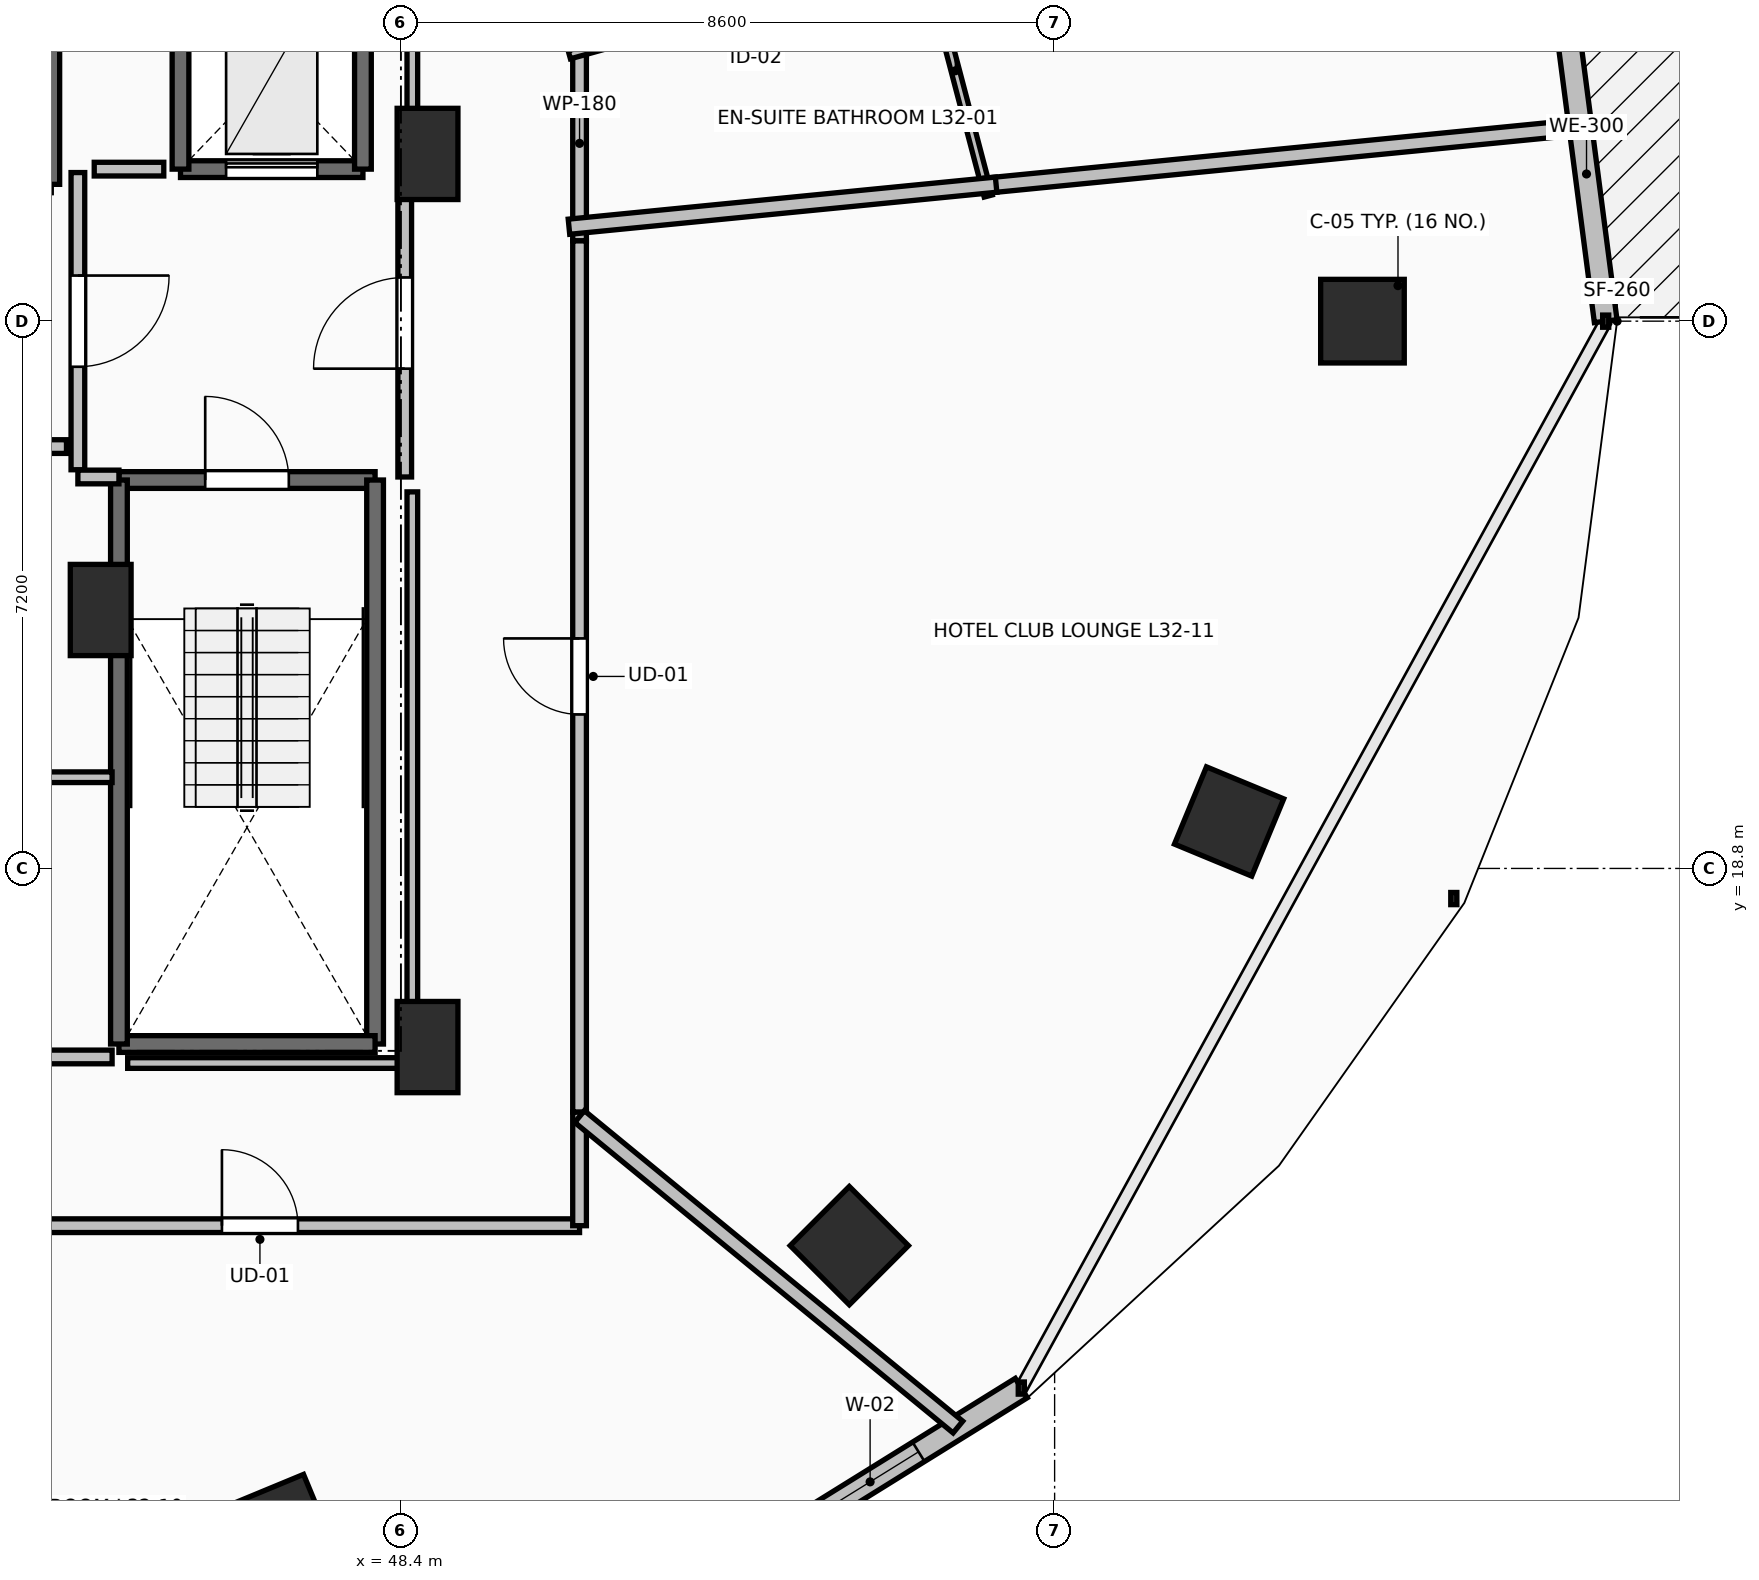
"""IFC4 building model, lengths in metres.
Left out: names, types, materials, properties, quantities, classifications, styles, units other than length and angle.
Written with IfcOpenShell. Run it as: python <this file> out.ifc"""

import sys

from ifc_helpers import new_model, si_unit, direction, frame, frame_2d, origin, origin_2d, place, context, subcontext, project, spatial, rectangle, extrude, element, fill, save


model = new_model("IFC4")
c1 = context("Model", 3, precision=1e-05, world=origin(), true_north=direction((0.0, 1.0)))
c2 = subcontext(c1, "Body", "Model", "MODEL_VIEW")
j1 = project(units=[si_unit("LENGTHUNIT", "METRE"), si_unit("PLANEANGLEUNIT", "RADIAN")], contexts=[c1])
p1 = place(None, origin())
s1 = spatial("IfcSite", under=j1, at=p1, CompositionType="ELEMENT")
p2 = place(p1, origin())
s2 = spatial("IfcBuilding", under=s1, at=p2, CompositionType="ELEMENT")
p3 = place(p2, frame((0.0, 0.0, 120.8)))
s3 = spatial("IfcBuildingStorey", under=s2, at=p3, CompositionType="ELEMENT", Elevation=120.8)
for number, where, z_axis, x_axis in (
    (1, (61.05, 26.0, 0.0), (0.0, 0.0, 1.0), (1.0, 0.0, 0.0)),
    (2, (46.821, 10.109, 0.0), (0.0, 0.0, 1.0), (0.383, -0.924, 0.0)),
    (3, (54.299, 13.838, 0.0), (0.0, 0.0, 1.0), (0.707, -0.707, 0.0)),
    (4, (59.295, 19.418, 0.0), (0.0, 0.0, 1.0), (0.924, -0.383, 0.0)),
):
    element("IfcColumn", number, at=place(p3, frame(where, z_axis=z_axis, x_axis=x_axis)), inside=s3, PredefinedType="COLUMN", context=c2, shape_type="SweptSolid", body=[
        extrude(rectangle(XDim=1.1, YDim=1.1, at=origin_2d()), origin(), (0.0, 0.0, 1.0), 3.5),
    ])
for number, where, z_axis, x_axis in (
    (5, (48.75, 28.2, 0.0), (0.0, 0.0, 1.0), (1.0, 0.0, 0.0)),
    (6, (48.75, 16.45, 0.0), (0.0, 0.0, 1.0), (1.0, 0.0, 0.0)),
    (7, (44.45, 22.2, 0.0), (0.0, 0.0, 1.0), (1.0, 0.0, 0.0)),
):
    element("IfcColumn", number, at=place(p3, frame(where, z_axis=z_axis, x_axis=x_axis)), inside=s3, PredefinedType="PILASTER", context=c2, shape_type="SweptSolid", body=[
        extrude(rectangle(XDim=0.8, YDim=1.2, at=origin_2d()), origin(), (0.0, 0.0, 1.0), 3.5),
    ])
p4 = place(p3, frame((64.25, 26.0, 0.0), z_axis=(0.0, 0.0, 1.0), x_axis=(-0.129157444793, 0.991624099372, 0.0)))
e8 = element("IfcWall", 8, at=p4, inside=s3, PredefinedType="STANDARD", context=c2, shape_type="SweptSolid", body=[
    extrude(rectangle(XDim=3.905, YDim=0.3, at=frame_2d((1.953, 0.0))), origin(), (0.0, 0.0, 1.0), 3.15),
])
p5 = place(p3, frame((52.584, 9.495, 0.0), z_axis=(0.0, 0.0, 1.0), x_axis=(0.849684479743, 0.527291461038, 0.0)))
e9 = element("IfcWall", 9, at=p5, inside=s3, PredefinedType="STANDARD", context=c2, shape_type="SweptSolid", body=[
    extrude(rectangle(XDim=4.681, YDim=0.3, at=frame_2d((2.341, 0.0))), origin(), (0.0, 0.0, 1.0), 3.15),
])
p6 = place(p5, frame((1.591, 0.0, 0.85)))
e10 = element("IfcOpeningElement", 10, at=p6, cuts=e9, PredefinedType="OPENING", context=c2, shape_type="SweptSolid", body=[
    extrude(rectangle(XDim=1.5, YDim=2.1, at=frame_2d((0.75, 1.05))), frame((0.0, 0.165, 0.0), z_axis=(0.0, -1.0, 0.0), x_axis=(1.0, 0.0, 0.0)), (0.0, 0.0, 1.0), 0.33),
])
p7 = place(p3, frame((44.69, 23.91, 0.0), z_axis=(0.0, 0.0, 1.0), x_axis=(1.0, 0.0, 0.0)))
e11 = element("IfcWall", 11, at=p7, inside=s3, PredefinedType="SOLIDWALL", context=c2, shape_type="SweptSolid", body=[
    extrude(rectangle(XDim=3.37, YDim=0.22, at=frame_2d((1.685, 0.0))), origin(), (0.0, 0.0, 1.0), 3.15),
])
p8 = place(p7, frame((1.135, 0.0, 0.0)))
e12 = element("IfcOpeningElement", 12, at=p8, cuts=e11, PredefinedType="OPENING", context=c2, shape_type="SweptSolid", body=[
    extrude(rectangle(XDim=1.1, YDim=2.15, at=frame_2d((0.55, 1.075))), frame((0.0, 0.125, 0.0), z_axis=(0.0, -1.0, 0.0), x_axis=(1.0, 0.0, 0.0)), (0.0, 0.0, 1.0), 0.25),
])
p9 = place(p3, frame((48.06, 23.91, 0.0), z_axis=(0.0, 0.0, 1.0), x_axis=(0.0, -1.0, 0.0)))
e13 = element("IfcWall", 13, at=p9, inside=s3, PredefinedType="SOLIDWALL", context=c2, shape_type="SweptSolid", body=[
    extrude(rectangle(XDim=7.42, YDim=0.22, at=frame_2d((3.71, 0.0))), origin(), (0.0, 0.0, 1.0), 3.15),
])
p10 = place(p3, frame((48.06, 16.49, 0.0), z_axis=(0.0, 0.0, 1.0), x_axis=(-1.0, 0.0, 0.0)))
e14 = element("IfcWall", 14, at=p10, inside=s3, PredefinedType="SOLIDWALL", context=c2, shape_type="SweptSolid", body=[
    extrude(rectangle(XDim=3.37, YDim=0.22, at=frame_2d((1.685, 0.0))), origin(), (0.0, 0.0, 1.0), 3.15),
])
p11 = place(p3, frame((44.69, 16.49, 0.0), z_axis=(0.0, 0.0, 1.0), x_axis=(0.0, 1.0, 0.0)))
e15 = element("IfcWall", 15, at=p11, inside=s3, PredefinedType="SOLIDWALL", context=c2, shape_type="SweptSolid", body=[
    extrude(rectangle(XDim=7.42, YDim=0.22, at=frame_2d((3.71, 0.0))), origin(), (0.0, 0.0, 1.0), 3.15),
])
p12 = place(p3, frame((43.8, 27.8, 0.0), z_axis=(0.0, 0.0, 1.0), x_axis=(0.0, 1.0, 0.0)))
e16 = element("IfcWall", 16, at=p12, inside=s3, PredefinedType="SOLIDWALL", context=c2, shape_type="SweptSolid", body=[
    extrude(rectangle(XDim=2.6, YDim=0.22, at=frame_2d((1.3, 0.0))), origin(), (0.0, 0.0, 1.0), 3.15),
])
p13 = place(p3, frame((45.5, 28.0, 0.0), z_axis=(0.0, 0.0, 1.0), x_axis=(1.0, 0.0, 0.0)))
e17 = element("IfcWall", 17, at=p13, inside=s3, PredefinedType="SHEAR", context=c2, shape_type="SweptSolid", body=[
    extrude(rectangle(XDim=2.4, YDim=0.22, at=frame_2d((1.2, 0.0))), origin(), (0.0, 0.0, 1.0), 3.15),
])
p14 = place(p13, frame((0.6, 0.0, 0.0)))
e18 = element("IfcOpeningElement", 18, at=p14, cuts=e17, PredefinedType="OPENING", context=c2, shape_type="SweptSolid", body=[
    extrude(rectangle(XDim=1.2, YDim=2.2, at=frame_2d((0.6, 1.1))), frame((0.0, 0.125, 0.0), z_axis=(0.0, -1.0, 0.0), x_axis=(1.0, 0.0, 0.0)), (0.0, 0.0, 1.0), 0.25),
])
for number, where, z_axis, x_axis in (
    (19, (47.9, 28.0, 0.0), (0.0, 0.0, 1.0), (0.0, 1.0, 0.0)),
    (20, (45.5, 30.5, 0.0), (0.0, 0.0, 1.0), (0.0, -1.0, 0.0)),
):
    element("IfcWall", number, at=place(p3, frame(where, z_axis=z_axis, x_axis=x_axis)), inside=s3, PredefinedType="SHEAR", context=c2, shape_type="SweptSolid", body=[
        extrude(rectangle(XDim=2.5, YDim=0.22, at=frame_2d((1.25, 0.0))), origin(), (0.0, 0.0, 1.0), 3.15),
    ])
p15 = place(p3, frame((44.15, 27.955, 0.0), z_axis=(0.0, 0.0, 1.0), x_axis=(0.0, -1.0, 0.0)))
e21 = element("IfcWall", 21, at=p15, inside=s3, PredefinedType="PARTITIONING", context=c2, shape_type="SweptSolid", body=[
    extrude(rectangle(XDim=3.91, YDim=0.18, at=frame_2d((1.955, 0.0))), origin(), (0.0, 0.0, 1.0), 3.15),
])
p16 = place(p15, frame((1.355, 0.0, 0.0)))
e22 = element("IfcOpeningElement", 22, at=p16, cuts=e21, PredefinedType="OPENING", context=c2, shape_type="SweptSolid", body=[
    extrude(rectangle(XDim=1.2, YDim=2.15, at=frame_2d((0.6, 1.075))), frame((0.0, 0.105, 0.0), z_axis=(0.0, -1.0, 0.0), x_axis=(1.0, 0.0, 0.0)), (0.0, 0.0, 1.0), 0.21),
])
p17 = place(p3, frame((44.15, 23.95, 0.0), z_axis=(0.0, 0.0, 1.0), x_axis=(1.0, 0.0, 0.0)))
e23 = element("IfcWall", 23, at=p17, inside=s3, PredefinedType="PARTITIONING", context=c2, shape_type="SweptSolid", body=[
    extrude(rectangle(XDim=0.54, YDim=0.18, at=frame_2d((0.27, 0.0))), origin(), (0.0, 0.0, 1.0), 3.15),
])
p18 = place(p3, frame((48.45, 23.95, 0.0), z_axis=(0.0, 0.0, 1.0), x_axis=(0.0, 1.0, 0.0)))
e24 = element("IfcWall", 24, at=p18, inside=s3, PredefinedType="PARTITIONING", context=c2, shape_type="SweptSolid", body=[
    extrude(rectangle(XDim=4.05, YDim=0.18, at=frame_2d((2.025, 0.0))), origin(), (0.0, 0.0, 1.0), 3.15),
])
p19 = place(p18, frame((1.425, 0.0, 0.0)))
e25 = element("IfcOpeningElement", 25, at=p19, cuts=e24, PredefinedType="OPENING", context=c2, shape_type="SweptSolid", body=[
    extrude(rectangle(XDim=1.2, YDim=2.15, at=frame_2d((0.6, 1.075))), frame((0.0, 0.105, 0.0), z_axis=(0.0, -1.0, 0.0), x_axis=(1.0, 0.0, 0.0)), (0.0, 0.0, 1.0), 0.21),
])
p20 = place(p3, frame((41.555, 24.35, 0.0), z_axis=(0.0, 0.0, 1.0), x_axis=(1.0, 0.0, 0.0)))
e26 = element("IfcWall", 26, at=p20, inside=s3, PredefinedType="PARTITIONING", context=c2, shape_type="SweptSolid", body=[
    extrude(rectangle(XDim=2.445, YDim=0.18, at=frame_2d((1.223, 0.0))), origin(), (0.0, 0.0, 1.0), 3.15),
])
p21 = place(p20, frame((0.798, 0.0, 0.0)))
e27 = element("IfcOpeningElement", 27, at=p21, cuts=e26, PredefinedType="OPENING", context=c2, shape_type="SweptSolid", body=[
    extrude(rectangle(XDim=0.85, YDim=2.1, at=frame_2d((0.425, 1.05))), frame((0.0, 0.105, 0.0), z_axis=(0.0, -1.0, 0.0), x_axis=(1.0, 0.0, 0.0)), (0.0, 0.0, 1.0), 0.21),
])
p22 = place(p3, frame((44.6, 20.0, 0.0), z_axis=(0.0, 0.0, 1.0), x_axis=(-1.0, 0.0, 0.0)))
e28 = element("IfcWall", 28, at=p22, inside=s3, PredefinedType="PARTITIONING", context=c2, shape_type="SweptSolid", body=[
    extrude(rectangle(XDim=3.2, YDim=0.14, at=frame_2d((1.6, 0.0))), origin(), (0.0, 0.0, 1.0), 3.15),
])
p23 = place(p3, frame((41.4, 16.32, 0.0), z_axis=(0.0, 0.0, 1.0), x_axis=(1.0, 0.0, 0.0)))
e29 = element("IfcWall", 29, at=p23, inside=s3, PredefinedType="PARTITIONING", context=c2, shape_type="SweptSolid", body=[
    extrude(rectangle(XDim=3.2, YDim=0.18, at=frame_2d((1.6, 0.0))), origin(), (0.0, 0.0, 1.0), 3.15),
])
p24 = place(p23, frame((1.2, 0.0, 0.0)))
e30 = element("IfcOpeningElement", 30, at=p24, cuts=e29, PredefinedType="OPENING", context=c2, shape_type="SweptSolid", body=[
    extrude(rectangle(XDim=0.8, YDim=2.05, at=frame_2d((0.4, 1.025))), frame((0.0, 0.105, 0.0), z_axis=(0.0, -1.0, 0.0), x_axis=(1.0, 0.0, 0.0)), (0.0, 0.0, 1.0), 0.21),
])
p25 = place(p3, frame((50.75, 29.482, 0.0), z_axis=(0.0, 0.0, 1.0), x_axis=(0.0, 1.0, 0.0)))
e31 = element("IfcWall", 31, at=p25, inside=s3, PredefinedType="PARTITIONING", context=c2, shape_type="SweptSolid", body=[
    extrude(rectangle(XDim=3.401, YDim=0.18, at=frame_2d((1.701, 0.0))), origin(), (0.0, 0.0, 1.0), 2.342),
])
p26 = place(p25, frame((1.176, 0.0, 0.0)))
e32 = element("IfcOpeningElement", 32, at=p26, cuts=e31, PredefinedType="OPENING", context=c2, shape_type="SweptSolid", body=[
    extrude(rectangle(XDim=1.05, YDim=2.2, at=frame_2d((0.525, 1.1))), frame((0.0, 0.105, 0.0), z_axis=(0.0, -1.0, 0.0), x_axis=(1.0, 0.0, 0.0)), (0.0, 0.0, 1.0), 0.21),
])
p27 = place(p3, frame((50.75, 27.056, 0.0), z_axis=(0.0, 0.0, 1.0), x_axis=(0.0, 1.0, 0.0)))
e33 = element("IfcWall", 33, at=p27, inside=s3, PredefinedType="PARTITIONING", context=c2, shape_type="SweptSolid", body=[
    extrude(rectangle(XDim=2.566, YDim=0.18, at=frame_2d((1.283, 0.0))), origin(), (0.0, 0.0, 1.0), 2.342),
])
p28 = place(p3, frame((42.34, 14.1, 0.0), z_axis=(0.0, 0.0, 1.0), x_axis=(1.0, 0.0, 0.0)))
e34 = element("IfcWall", 34, at=p28, inside=s3, PredefinedType="PARTITIONING", context=c2, shape_type="SweptSolid", body=[
    extrude(rectangle(XDim=8.41, YDim=0.18, at=frame_2d((4.205, 0.0))), origin(), (0.0, 0.0, 1.0), 2.342),
])
p29 = place(p28, frame((3.705, 0.0, 0.0)))
e35 = element("IfcOpeningElement", 35, at=p29, cuts=e34, PredefinedType="OPENING", context=c2, shape_type="SweptSolid", body=[
    extrude(rectangle(XDim=1.0, YDim=2.15, at=frame_2d((0.5, 1.075))), frame((0.0, 0.105, 0.0), z_axis=(0.0, -1.0, 0.0), x_axis=(1.0, 0.0, 0.0)), (0.0, 0.0, 1.0), 0.21),
])
p30 = place(p3, frame((50.75, 14.1, 0.0), z_axis=(0.0, 0.0, 1.0), x_axis=(0.0, 1.0, 0.0)))
e36 = element("IfcWall", 36, at=p30, inside=s3, PredefinedType="PARTITIONING", context=c2, shape_type="SweptSolid", body=[
    extrude(rectangle(XDim=1.496, YDim=0.18, at=frame_2d((0.748, 0.0))), origin(), (0.0, 0.0, 1.0), 2.342),
])
p31 = place(p3, frame((50.75, 15.596, 0.0), z_axis=(0.0, 0.0, 1.0), x_axis=(0.0, 1.0, 0.0)))
e37 = element("IfcWall", 37, at=p31, inside=s3, PredefinedType="PARTITIONING", context=c2, shape_type="SweptSolid", body=[
    extrude(rectangle(XDim=11.46, YDim=0.18, at=frame_2d((5.73, 0.0))), origin(), (0.0, 0.0, 1.0), 2.342),
])
p32 = place(p31, frame((5.23, 0.0, 0.0)))
e38 = element("IfcOpeningElement", 38, at=p32, cuts=e37, PredefinedType="OPENING", context=c2, shape_type="SweptSolid", body=[
    extrude(rectangle(XDim=1.0, YDim=2.15, at=frame_2d((0.5, 1.075))), frame((0.0, 0.105, 0.0), z_axis=(0.0, -1.0, 0.0), x_axis=(1.0, 0.0, 0.0)), (0.0, 0.0, 1.0), 0.21),
])
p33 = place(p3, frame((55.26, 30.94, 0.0), z_axis=(0.0, 0.0, 1.0), x_axis=(0.254323935255, -0.967119090886, 0.0)))
e39 = element("IfcWall", 39, at=p33, inside=s3, PredefinedType="PARTITIONING", context=c2, shape_type="SweptSolid", body=[
    extrude(rectangle(XDim=3.406, YDim=0.11, at=frame_2d((1.703, 0.0))), origin(), (0.0, 0.0, 1.0), 2.839),
])
p34 = place(p3, frame((50.615, 29.504, 0.0), z_axis=(0.0, 0.0, 1.0), x_axis=(0.963498313434, 0.267714400078, 0.0)))
e40 = element("IfcWall", 40, at=p34, inside=s3, PredefinedType="PARTITIONING", context=c2, shape_type="SweptSolid", body=[
    extrude(rectangle(XDim=4.998, YDim=0.11, at=frame_2d((2.499, 0.0))), origin(), (0.0, 0.0, 1.0), 2.784),
])
p35 = place(p34, frame((2.074, 0.0, 0.0)))
e41 = element("IfcOpeningElement", 41, at=p35, cuts=e40, PredefinedType="OPENING", context=c2, shape_type="SweptSolid", body=[
    extrude(rectangle(XDim=0.85, YDim=2.1, at=frame_2d((0.425, 1.05))), frame((0.0, 0.07, 0.0), z_axis=(0.0, -1.0, 0.0), x_axis=(1.0, 0.0, 0.0)), (0.0, 0.0, 1.0), 0.14),
])
p36 = place(p3, frame((56.091, 27.782, 0.0), z_axis=(0.0, 0.0, 1.0), x_axis=(0.995182127762, 0.098043523927, 0.0)))
e42 = element("IfcWall", 42, at=p36, inside=s3, PredefinedType="PARTITIONING", context=c2, shape_type="SweptSolid", body=[
    extrude(rectangle(XDim=7.864, YDim=0.2, at=frame_2d((3.932, 0.0))), origin(), (0.0, 0.0, 1.0), 2.587),
])
p37 = place(p3, frame((50.611, 27.242, 0.0), z_axis=(0.0, 0.0, 1.0), x_axis=(0.995185043486, 0.098013923607, 0.0)))
e43 = element("IfcWall", 43, at=p37, inside=s3, PredefinedType="PARTITIONING", context=c2, shape_type="SweptSolid", body=[
    extrude(rectangle(XDim=5.647, YDim=0.2, at=frame_2d((2.823, 0.0))), origin(), (0.0, 0.0, 1.0), 2.342),
])
p38 = place(p3, frame((55.728, 11.451, 0.0), z_axis=(0.0, 0.0, 1.0), x_axis=(-0.7730409537, 0.634356117573, 0.0)))
e44 = element("IfcWall", 44, at=p38, inside=s3, PredefinedType="PARTITIONING", context=c2, shape_type="SweptSolid", body=[
    extrude(rectangle(XDim=6.439, YDim=0.2, at=frame_2d((3.22, 0.0))), origin(), (0.0, 0.0, 1.0), 2.342),
])
p39 = place(p3, frame((45.28, 28.0, 0.0), z_axis=(0.0, 0.0, 1.0), x_axis=(-1.0, 0.0, 0.0)))
e45 = element("IfcWall", 45, at=p39, inside=s3, PredefinedType="PARTITIONING", context=c2, shape_type="SweptSolid", body=[
    extrude(rectangle(XDim=0.915, YDim=0.18, at=frame_2d((0.458, 0.0))), origin(), (0.0, 0.0, 1.0), 3.15),
])
p40 = place(p3, frame((48.55, 33.45, 0.0), z_axis=(0.0, 0.0, 1.0), x_axis=(0.0, -1.0, 0.0)))
e46 = element("IfcWall", 46, at=p40, inside=s3, PredefinedType="PARTITIONING", context=c2, shape_type="SweptSolid", body=[
    extrude(rectangle(XDim=5.254, YDim=0.14, at=frame_2d((2.627, 0.0))), origin(), (0.0, 0.0, 1.0), 2.342),
])
p41 = place(p3, frame((48.55, 23.754, 0.0), z_axis=(0.0, 0.0, 1.0), x_axis=(0.0, -1.0, 0.0)))
e47 = element("IfcWall", 47, at=p41, inside=s3, PredefinedType="PARTITIONING", context=c2, shape_type="SweptSolid", body=[
    extrude(rectangle(XDim=7.514, YDim=0.14, at=frame_2d((3.757, 0.0))), origin(), (0.0, 0.0, 1.0), 2.342),
])
p42 = place(p3, frame((48.55, 16.24, 0.0), z_axis=(0.0, 0.0, 1.0), x_axis=(-1.0, 0.0, 0.0)))
e48 = element("IfcWall", 48, at=p42, inside=s3, PredefinedType="PARTITIONING", context=c2, shape_type="SweptSolid", body=[
    extrude(rectangle(XDim=3.745, YDim=0.14, at=frame_2d((1.873, 0.0))), origin(), (0.0, 0.0, 1.0), 2.342),
])
p43 = place(p6, origin())
e49 = element("IfcWindow", 49, at=p43, inside=s3, PartitioningType="SINGLE_PANEL", PredefinedType="WINDOW", context=c2, shape_type="SweptSolid", body=[
    extrude(rectangle(XDim=1.5, YDim=2.1, at=frame_2d((0.75, 1.05))), frame((0.0, 0.03, 0.0), z_axis=(0.0, -1.0, 0.0), x_axis=(1.0, 0.0, 0.0)), (0.0, 0.0, 1.0), 0.06),
])
fill(e10, e49)
p44 = place(p8, origin())
e50 = element("IfcDoor", 50, at=p44, inside=s3, OperationType="SINGLE_SWING_LEFT", PredefinedType="DOOR", context=c2, shape_type="SweptSolid", body=[
    extrude(rectangle(XDim=1.1, YDim=2.15, at=frame_2d((0.55, 1.075))), frame((0.0, 0.025, 0.0), z_axis=(0.0, -1.0, 0.0), x_axis=(1.0, 0.0, 0.0)), (0.0, 0.0, 1.0), 0.05),
])
fill(e12, e50)
p45 = place(p14, origin())
e51 = element("IfcDoor", 51, at=p45, inside=s3, OperationType="SLIDING_TO_LEFT", PredefinedType="DOOR", context=c2, shape_type="SweptSolid", body=[
    extrude(rectangle(XDim=1.2, YDim=2.2, at=frame_2d((0.6, 1.1))), frame((0.0, 0.025, 0.0), z_axis=(0.0, -1.0, 0.0), x_axis=(1.0, 0.0, 0.0)), (0.0, 0.0, 1.0), 0.05),
])
fill(e18, e51)
p46 = place(p16, origin())
e52 = element("IfcDoor", 52, at=p46, inside=s3, OperationType="SINGLE_SWING_LEFT", PredefinedType="DOOR", context=c2, shape_type="SweptSolid", body=[
    extrude(rectangle(XDim=1.2, YDim=2.15, at=frame_2d((0.6, 1.075))), frame((0.0, 0.025, 0.0), z_axis=(0.0, -1.0, 0.0), x_axis=(1.0, 0.0, 0.0)), (0.0, 0.0, 1.0), 0.05),
])
fill(e22, e52)
p47 = place(p19, origin())
e53 = element("IfcDoor", 53, at=p47, inside=s3, OperationType="SINGLE_SWING_LEFT", PredefinedType="DOOR", context=c2, shape_type="SweptSolid", body=[
    extrude(rectangle(XDim=1.2, YDim=2.15, at=frame_2d((0.6, 1.075))), frame((0.0, 0.025, 0.0), z_axis=(0.0, -1.0, 0.0), x_axis=(1.0, 0.0, 0.0)), (0.0, 0.0, 1.0), 0.05),
])
fill(e25, e53)
p48 = place(p29, origin())
e54 = element("IfcDoor", 54, at=p48, inside=s3, OperationType="SINGLE_SWING_LEFT", PredefinedType="DOOR", context=c2, shape_type="SweptSolid", body=[
    extrude(rectangle(XDim=1.0, YDim=2.15, at=frame_2d((0.5, 1.075))), frame((0.0, 0.025, 0.0), z_axis=(0.0, -1.0, 0.0), x_axis=(1.0, 0.0, 0.0)), (0.0, 0.0, 1.0), 0.05),
])
fill(e35, e54)
p49 = place(p32, origin())
e55 = element("IfcDoor", 55, at=p49, inside=s3, OperationType="SINGLE_SWING_RIGHT", PredefinedType="DOOR", context=c2, shape_type="SweptSolid", body=[
    extrude(rectangle(XDim=1.0, YDim=2.15, at=frame_2d((0.5, 1.075))), frame((0.0, 0.025, 0.0), z_axis=(0.0, -1.0, 0.0), x_axis=(1.0, 0.0, 0.0)), (0.0, 0.0, 1.0), 0.05),
])
fill(e38, e55)
save(model, sys.argv[1])
